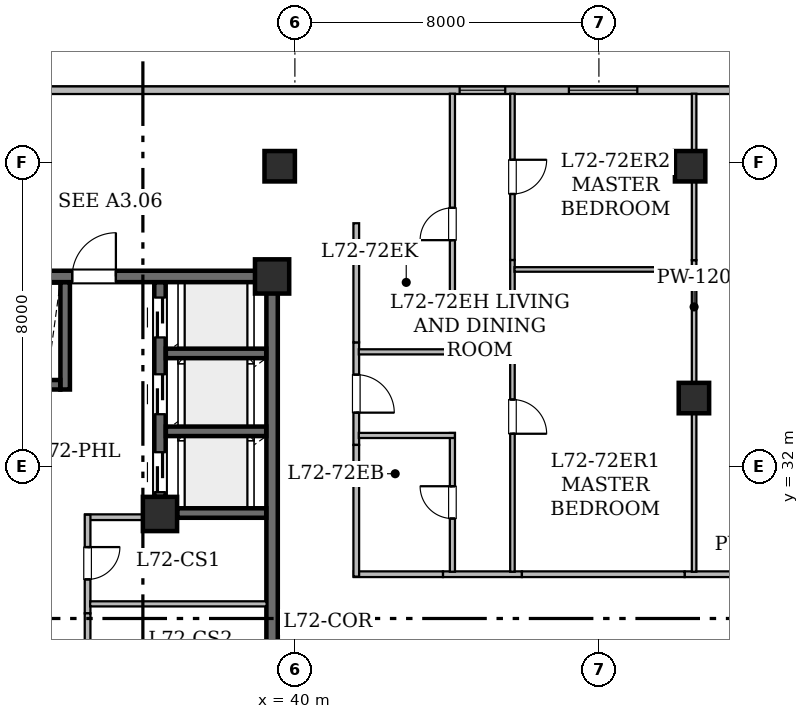
"""IFC4 building model, lengths in metres.
Left out: names, types, materials, properties, quantities, classifications, styles, units other than length and angle.
Written with IfcOpenShell. Run it as: python <this file> out.ifc"""

import sys

from ifc_helpers import new_model, si_unit, direction, frame, frame_2d, origin, origin_2d, place, context, subcontext, project, spatial, rectangle, hollow_rectangle, extrude, element, fill, save


model = new_model("IFC4")
c1 = context("Model", 3, precision=1e-05, world=origin(), true_north=direction((0.0, 1.0)))
c2 = subcontext(c1, "Body", "Model", "MODEL_VIEW")
j1 = project(units=[si_unit("LENGTHUNIT", "METRE"), si_unit("PLANEANGLEUNIT", "RADIAN")], contexts=[c1])
p1 = place(None, origin())
s1 = spatial("IfcSite", under=j1, at=p1, CompositionType="ELEMENT")
p2 = place(p1, origin())
s2 = spatial("IfcBuilding", under=s1, at=p2, CompositionType="ELEMENT")
p3 = place(p2, frame((0.0, 0.0, 282.05)))
s3 = spatial("IfcBuildingStorey", under=s2, at=p3, CompositionType="ELEMENT", Elevation=282.05)
for number, where, z_axis, x_axis in (
    (1, (36.45, 30.75, 0.0), (0.0, 0.0, 1.0), (1.0, 0.0, 0.0)),
    (2, (39.4, 37.0, 0.0), (0.0, 0.0, 1.0), (1.0, 0.0, 0.0)),
):
    element("IfcColumn", number, at=place(p3, frame(where, z_axis=z_axis, x_axis=x_axis)), inside=s3, PredefinedType="COLUMN", context=c2, shape_type="SweptSolid", body=[
        extrude(hollow_rectangle(XDim=0.9, YDim=0.9, WallThickness=0.045, at=origin_2d()), origin(), (0.0, 0.0, 1.0), 4.2),
    ])
for number, where, z_axis, x_axis in (
    (3, (39.6, 39.9, 0.0), (0.0, 0.0, 1.0), (1.0, 0.0, 0.0)),
    (4, (50.4, 39.9, 0.0), (0.0, 0.0, 1.0), (1.0, 0.0, 0.0)),
):
    element("IfcColumn", number, at=place(p3, frame(where, z_axis=z_axis, x_axis=x_axis)), inside=s3, PredefinedType="COLUMN", context=c2, shape_type="SweptSolid", body=[
        extrude(hollow_rectangle(XDim=0.8, YDim=0.8, WallThickness=0.04, at=origin_2d()), origin(), (0.0, 0.0, 1.0), 4.175),
    ])
p4 = place(p3, frame((50.5, 33.8, 0.0), z_axis=(0.0, 0.0, 1.0), x_axis=(1.0, 0.0, 0.0)))
e5 = element("IfcColumn", 5, at=p4, inside=s3, PredefinedType="COLUMN", context=c2, shape_type="SweptSolid", body=[
    extrude(hollow_rectangle(XDim=0.8, YDim=0.8, WallThickness=0.04, at=origin_2d()), origin(), (0.0, 0.0, 1.0), 4.2),
])
p5 = place(p3, frame((27.102, 41.9, 0.0), z_axis=(0.0, 0.0, 1.0), x_axis=(1.0, 0.0, 0.0)))
e6 = element("IfcWall", 6, at=p5, inside=s3, PredefinedType="STANDARD", context=c2, shape_type="SweptSolid", body=[
    extrude(rectangle(XDim=35.857, YDim=0.2, at=frame_2d((17.928, 0.0))), origin(), (0.0, 0.0, 1.0), 3.78),
])
p6 = place(p5, frame((28.338, 0.0, 0.85)))
e7 = element("IfcOpeningElement", 7, at=p6, cuts=e6, PredefinedType="OPENING", context=c2, shape_type="SweptSolid", body=[
    extrude(rectangle(XDim=1.8, YDim=0.92, at=frame_2d((0.9, 0.46))), frame((0.0, 0.11, 0.0), z_axis=(0.0, -1.0, 0.0), x_axis=(1.0, 0.0, 0.0)), (0.0, 0.0, 1.0), 0.22),
])
p7 = place(p5, frame((17.233, 0.0, 0.78)))
e8 = element("IfcOpeningElement", 8, at=p7, cuts=e6, PredefinedType="OPENING", context=c2, shape_type="SweptSolid", body=[
    extrude(rectangle(XDim=1.2, YDim=1.5, at=frame_2d((0.6, 0.75))), frame((0.0, 0.11, 0.0), z_axis=(0.0, -1.0, 0.0), x_axis=(1.0, 0.0, 0.0)), (0.0, 0.0, 1.0), 0.22),
])
p8 = place(p5, frame((20.108, 0.0, 0.85)))
e9 = element("IfcOpeningElement", 9, at=p8, cuts=e6, PredefinedType="OPENING", context=c2, shape_type="SweptSolid", body=[
    extrude(rectangle(XDim=1.8, YDim=0.92, at=frame_2d((0.9, 0.46))), frame((0.0, 0.11, 0.0), z_axis=(0.0, -1.0, 0.0), x_axis=(1.0, 0.0, 0.0)), (0.0, 0.0, 1.0), 0.22),
])
p9 = place(p3, frame((29.0, 37.0, 0.0), z_axis=(0.0, 0.0, 1.0), x_axis=(1.0, 0.0, 0.0)))
e10 = element("IfcWall", 10, at=p9, inside=s3, PredefinedType="SHEAR", context=c2, shape_type="SweptSolid", body=[
    extrude(rectangle(XDim=10.4, YDim=0.3, at=frame_2d((5.2, 0.0))), origin(), (0.0, 0.0, 1.0), 3.78),
])
p10 = place(p9, frame((5.14, 0.0, 0.0)))
e11 = element("IfcOpeningElement", 11, at=p10, cuts=e10, PredefinedType="OPENING", context=c2, shape_type="SweptSolid", body=[
    extrude(rectangle(XDim=1.15, YDim=2.2, at=frame_2d((0.575, 1.1))), frame((0.0, 0.16, 0.0), z_axis=(0.0, -1.0, 0.0), x_axis=(1.0, 0.0, 0.0)), (0.0, 0.0, 1.0), 0.32),
])
p11 = place(p3, frame((39.4, 24.4, 0.0), z_axis=(0.0, 0.0, 1.0), x_axis=(0.0, 1.0, 0.0)))
e12 = element("IfcWall", 12, at=p11, inside=s3, PredefinedType="SHEAR", context=c2, shape_type="SweptSolid", body=[
    extrude(rectangle(XDim=12.6, YDim=0.3, at=frame_2d((6.3, 0.0))), origin(), (0.0, 0.0, 1.0), 3.78),
])
p12 = place(p3, frame((36.45, 31.2, 0.0), z_axis=(0.0, 0.0, 1.0), x_axis=(0.0, 1.0, 0.0)))
e13 = element("IfcWall", 13, at=p12, inside=s3, PredefinedType="SHEAR", context=c2, shape_type="SweptSolid", body=[
    extrude(rectangle(XDim=5.646, YDim=0.3, at=frame_2d((2.823, 0.0))), origin(), (0.0, 0.0, 1.0), 3.78),
])
p13 = place(p12, frame((0.125, 0.0, 0.0)))
e14 = element("IfcOpeningElement", 14, at=p13, cuts=e13, PredefinedType="OPENING", context=c2, shape_type="SweptSolid", body=[
    extrude(rectangle(XDim=1.05, YDim=2.15, at=frame_2d((0.525, 1.075))), frame((0.0, 0.16, 0.0), z_axis=(0.0, -1.0, 0.0), x_axis=(1.0, 0.0, 0.0)), (0.0, 0.0, 1.0), 0.32),
])
p14 = place(p12, frame((2.175, 0.0, 0.0)))
e15 = element("IfcOpeningElement", 15, at=p14, cuts=e13, PredefinedType="OPENING", context=c2, shape_type="SweptSolid", body=[
    extrude(rectangle(XDim=1.05, YDim=2.15, at=frame_2d((0.525, 1.075))), frame((0.0, 0.16, 0.0), z_axis=(0.0, -1.0, 0.0), x_axis=(1.0, 0.0, 0.0)), (0.0, 0.0, 1.0), 0.32),
])
p15 = place(p12, frame((4.195, 0.0, 0.0)))
e16 = element("IfcOpeningElement", 16, at=p15, cuts=e13, PredefinedType="OPENING", context=c2, shape_type="SweptSolid", body=[
    extrude(rectangle(XDim=1.05, YDim=2.15, at=frame_2d((0.525, 1.075))), frame((0.0, 0.16, 0.0), z_axis=(0.0, -1.0, 0.0), x_axis=(1.0, 0.0, 0.0)), (0.0, 0.0, 1.0), 0.32),
])
p16 = place(p3, frame((36.904, 30.775, 0.0), z_axis=(0.0, 0.0, 1.0), x_axis=(1.0, 0.0, 0.0)))
e17 = element("IfcWall", 17, at=p16, inside=s3, PredefinedType="SHEAR", context=c2, shape_type="SweptSolid", body=[
    extrude(rectangle(XDim=2.342, YDim=0.25, at=frame_2d((1.171, 0.0))), origin(), (0.0, 0.0, 1.0), 3.78),
])
for number, where, z_axis, x_axis in (
    (18, (36.604, 32.925, 0.0), (0.0, 0.0, 1.0), (1.0, 0.0, 0.0)),
    (19, (36.604, 34.975, 0.0), (0.0, 0.0, 1.0), (1.0, 0.0, 0.0)),
):
    element("IfcWall", number, at=place(p3, frame(where, z_axis=z_axis, x_axis=x_axis)), inside=s3, PredefinedType="SHEAR", context=c2, shape_type="SweptSolid", body=[
        extrude(rectangle(XDim=2.642, YDim=0.25, at=frame_2d((1.321, 0.0))), origin(), (0.0, 0.0, 1.0), 3.78),
    ])
p17 = place(p3, frame((33.955, 34.025, 0.0), z_axis=(0.0, 0.0, 1.0), x_axis=(0.0, 1.0, 0.0)))
e20 = element("IfcWall", 20, at=p17, inside=s3, PredefinedType="SHEAR", context=c2, shape_type="SweptSolid", body=[
    extrude(rectangle(XDim=2.821, YDim=0.25, at=frame_2d((1.411, 0.0))), origin(), (0.0, 0.0, 1.0), 3.78),
])
p18 = place(p3, frame((32.804, 34.15, 0.0), z_axis=(0.0, 0.0, 1.0), x_axis=(1.0, 0.0, 0.0)))
e21 = element("IfcWall", 21, at=p18, inside=s3, PredefinedType="SHEAR", context=c2, shape_type="SweptSolid", body=[
    extrude(rectangle(XDim=1.022, YDim=0.25, at=frame_2d((0.511, 0.0))), origin(), (0.0, 0.0, 1.0), 3.78),
])
p19 = place(p3, frame((36.3, 30.665, 0.0), z_axis=(0.0, 0.0, 1.0), x_axis=(-1.0, 0.0, 0.0)))
e22 = element("IfcWall", 22, at=p19, inside=s3, PredefinedType="STANDARD", context=c2, shape_type="SweptSolid", body=[
    extrude(rectangle(XDim=1.82, YDim=0.15, at=frame_2d((0.91, 0.0))), origin(), (0.0, 0.0, 1.0), 3.78),
])
p20 = place(p3, frame((34.545, 30.73, 0.0), z_axis=(0.0, 0.0, 1.0), x_axis=(0.0, -1.0, 0.0)))
e23 = element("IfcWall", 23, at=p20, inside=s3, PredefinedType="STANDARD", context=c2, shape_type="SweptSolid", body=[
    extrude(rectangle(XDim=2.594, YDim=0.15, at=frame_2d((1.297, 0.0))), origin(), (0.0, 0.0, 1.0), 3.78),
])
p21 = place(p20, frame((0.851, 0.0, 0.0)))
e24 = element("IfcOpeningElement", 24, at=p21, cuts=e23, PredefinedType="OPENING", context=c2, shape_type="SweptSolid", body=[
    extrude(rectangle(XDim=0.85, YDim=2.1, at=frame_2d((0.425, 1.05))), frame((0.0, 0.085, 0.0), z_axis=(0.0, -1.0, 0.0), x_axis=(1.0, 0.0, 0.0)), (0.0, 0.0, 1.0), 0.17),
])
p22 = place(p3, frame((34.545, 28.136, 0.0), z_axis=(0.0, 0.0, 1.0), x_axis=(0.0, -1.0, 0.0)))
e25 = element("IfcWall", 25, at=p22, inside=s3, PredefinedType="STANDARD", context=c2, shape_type="SweptSolid", body=[
    extrude(rectangle(XDim=3.592, YDim=0.15, at=frame_2d((1.796, 0.0))), origin(), (0.0, 0.0, 1.0), 3.78),
])
p23 = place(p22, frame((1.346, 0.0, 0.0)))
e26 = element("IfcOpeningElement", 26, at=p23, cuts=e25, PredefinedType="OPENING", context=c2, shape_type="SweptSolid", body=[
    extrude(rectangle(XDim=0.9, YDim=2.1, at=frame_2d((0.45, 1.05))), frame((0.0, 0.085, 0.0), z_axis=(0.0, -1.0, 0.0), x_axis=(1.0, 0.0, 0.0)), (0.0, 0.0, 1.0), 0.17),
])
p24 = place(p3, frame((39.256, 28.385, 0.0), z_axis=(0.0, 0.0, 1.0), x_axis=(-1.0, 0.0, 0.0)))
e27 = element("IfcWall", 27, at=p24, inside=s3, PredefinedType="PARTITIONING", context=c2, shape_type="SweptSolid", body=[
    extrude(rectangle(XDim=4.644, YDim=0.135, at=frame_2d((2.322, 0.0))), origin(), (0.0, 0.0, 1.0), 3.78),
])
p25 = place(p3, frame((50.256, 29.165, 0.0), z_axis=(0.0, 0.0, 1.0), x_axis=(1.0, 0.0, 0.0)))
e28 = element("IfcWall", 28, at=p25, inside=s3, PredefinedType="STANDARD", context=c2, shape_type="SweptSolid", body=[
    extrude(rectangle(XDim=11.834, YDim=0.15, at=frame_2d((5.917, 0.0))), origin(), (0.0, 0.0, 1.0), 2.22),
])
p26 = place(p25, frame((5.488, 0.0, 0.0)))
e29 = element("IfcOpeningElement", 29, at=p26, cuts=e28, PredefinedType="OPENING", context=c2, shape_type="SweptSolid", body=[
    extrude(rectangle(XDim=0.9, YDim=2.1, at=frame_2d((0.45, 1.05))), frame((0.0, 0.085, 0.0), z_axis=(0.0, -1.0, 0.0), x_axis=(1.0, 0.0, 0.0)), (0.0, 0.0, 1.0), 0.17),
])
p27 = place(p3, frame((43.896, 29.165, 0.0), z_axis=(0.0, 0.0, 1.0), x_axis=(1.0, 0.0, 0.0)))
e30 = element("IfcWall", 30, at=p27, inside=s3, PredefinedType="STANDARD", context=c2, shape_type="SweptSolid", body=[
    extrude(rectangle(XDim=2.078, YDim=0.15, at=frame_2d((1.039, 0.0))), origin(), (0.0, 0.0, 1.0), 3.78),
])
p28 = place(p3, frame((41.615, 35.265, 0.0), z_axis=(0.0, 0.0, 1.0), x_axis=(0.0, -1.0, 0.0)))
e31 = element("IfcWall", 31, at=p28, inside=s3, PredefinedType="STANDARD", context=c2, shape_type="SweptSolid", body=[
    extrude(rectangle(XDim=2.698, YDim=0.15, at=frame_2d((1.349, 0.0))), origin(), (0.0, 0.0, 1.0), 3.78),
])
p29 = place(p28, frame((0.849, 0.0, 0.0)))
e32 = element("IfcOpeningElement", 32, at=p29, cuts=e31, PredefinedType="OPENING", context=c2, shape_type="SweptSolid", body=[
    extrude(rectangle(XDim=1.0, YDim=2.15, at=frame_2d((0.5, 1.075))), frame((0.0, 0.085, 0.0), z_axis=(0.0, -1.0, 0.0), x_axis=(1.0, 0.0, 0.0)), (0.0, 0.0, 1.0), 0.17),
])
p30 = place(p3, frame((41.55, 29.165, 0.0), z_axis=(0.0, 0.0, 1.0), x_axis=(1.0, 0.0, 0.0)))
e33 = element("IfcWall", 33, at=p30, inside=s3, PredefinedType="STANDARD", context=c2, shape_type="SweptSolid", body=[
    extrude(rectangle(XDim=2.346, YDim=0.15, at=frame_2d((1.173, 0.0))), origin(), (0.0, 0.0, 1.0), 3.78),
])
p31 = place(p3, frame((41.615, 32.567, 0.0), z_axis=(0.0, 0.0, 1.0), x_axis=(0.0, -1.0, 0.0)))
e34 = element("IfcWall", 34, at=p31, inside=s3, PredefinedType="STANDARD", context=c2, shape_type="SweptSolid", body=[
    extrude(rectangle(XDim=3.465, YDim=0.15, at=frame_2d((1.732, 0.0))), origin(), (0.0, 0.0, 1.0), 3.78),
])
p32 = place(p3, frame((41.615, 38.4, 0.0), z_axis=(0.0, 0.0, 1.0), x_axis=(0.0, -1.0, 0.0)))
e35 = element("IfcWall", 35, at=p32, inside=s3, PredefinedType="STANDARD", context=c2, shape_type="SweptSolid", body=[
    extrude(rectangle(XDim=3.135, YDim=0.15, at=frame_2d((1.567, 0.0))), origin(), (0.0, 0.0, 1.0), 2.22),
])
p33 = place(p3, frame((45.974, 29.165, 0.0), z_axis=(0.0, 0.0, 1.0), x_axis=(1.0, 0.0, 0.0)))
e36 = element("IfcWall", 36, at=p33, inside=s3, PredefinedType="STANDARD", context=c2, shape_type="SweptSolid", body=[
    extrude(rectangle(XDim=4.282, YDim=0.15, at=frame_2d((2.141, 0.0))), origin(), (0.0, 0.0, 1.0), 2.22),
])
p34 = place(p3, frame((50.505, 29.23, 0.0), z_axis=(0.0, 0.0, 1.0), x_axis=(0.0, 1.0, 0.0)))
e37 = element("IfcWall", 37, at=p34, inside=s3, PredefinedType="PARTITIONING", context=c2, shape_type="SweptSolid", body=[
    extrude(rectangle(XDim=8.198, YDim=0.12, at=frame_2d((4.099, 0.0))), origin(), (0.0, 0.0, 1.0), 2.22),
])
p35 = place(p3, frame((50.505, 37.428, 0.0), z_axis=(0.0, 0.0, 1.0), x_axis=(0.0, 1.0, 0.0)))
e38 = element("IfcWall", 38, at=p35, inside=s3, PredefinedType="PARTITIONING", context=c2, shape_type="SweptSolid", body=[
    extrude(rectangle(XDim=4.38, YDim=0.12, at=frame_2d((2.19, 0.0))), origin(), (0.0, 0.0, 1.0), 2.22),
])
p36 = place(p3, frame((44.145, 29.23, 0.0), z_axis=(0.0, 0.0, 1.0), x_axis=(0.0, 1.0, 0.0)))
e39 = element("IfcWall", 39, at=p36, inside=s3, PredefinedType="PARTITIONING", context=c2, shape_type="SweptSolid", body=[
    extrude(rectangle(XDim=3.651, YDim=0.135, at=frame_2d((1.826, 0.0))), origin(), (0.0, 0.0, 1.0), 3.78),
])
p37 = place(p36, frame((1.4, 0.0, 0.0)))
e40 = element("IfcOpeningElement", 40, at=p37, cuts=e39, PredefinedType="OPENING", context=c2, shape_type="SweptSolid", body=[
    extrude(rectangle(XDim=0.85, YDim=2.1, at=frame_2d((0.425, 1.05))), frame((0.0, 0.077, 0.0), z_axis=(0.0, -1.0, 0.0), x_axis=(1.0, 0.0, 0.0)), (0.0, 0.0, 1.0), 0.155),
])
for number, where, z_axis, x_axis in (
    (41, (44.21, 32.816, 0.0), (0.0, 0.0, 1.0), (-1.0, 0.0, 0.0)),
    (42, (41.682, 35.016, 0.0), (0.0, 0.0, 1.0), (1.0, 0.0, 0.0)),
):
    element("IfcWall", number, at=place(p3, frame(where, z_axis=z_axis, x_axis=x_axis)), inside=s3, PredefinedType="PARTITIONING", context=c2, shape_type="SweptSolid", body=[
        extrude(rectangle(XDim=2.528, YDim=0.135, at=frame_2d((1.264, 0.0))), origin(), (0.0, 0.0, 1.0), 3.78),
    ])
p38 = place(p3, frame((44.145, 34.951, 0.0), z_axis=(0.0, 0.0, 1.0), x_axis=(0.0, 1.0, 0.0)))
e43 = element("IfcWall", 43, at=p38, inside=s3, PredefinedType="PARTITIONING", context=c2, shape_type="SweptSolid", body=[
    extrude(rectangle(XDim=6.857, YDim=0.135, at=frame_2d((3.429, 0.0))), origin(), (0.0, 0.0, 1.0), 2.22),
])
p39 = place(p38, frame((3.004, 0.0, 0.0)))
e44 = element("IfcOpeningElement", 44, at=p39, cuts=e43, PredefinedType="OPENING", context=c2, shape_type="SweptSolid", body=[
    extrude(rectangle(XDim=0.85, YDim=2.1, at=frame_2d((0.425, 1.05))), frame((0.0, 0.077, 0.0), z_axis=(0.0, -1.0, 0.0), x_axis=(1.0, 0.0, 0.0)), (0.0, 0.0, 1.0), 0.155),
])
p40 = place(p3, frame((45.725, 37.433, 0.0), z_axis=(0.0, 0.0, 1.0), x_axis=(0.0, -1.0, 0.0)))
e45 = element("IfcWall", 45, at=p40, inside=s3, PredefinedType="PARTITIONING", context=c2, shape_type="SweptSolid", body=[
    extrude(rectangle(XDim=8.203, YDim=0.12, at=frame_2d((4.102, 0.0))), origin(), (0.0, 0.0, 1.0), 2.22),
])
p41 = place(p40, frame((3.672, 0.0, 0.0)))
e46 = element("IfcOpeningElement", 46, at=p41, cuts=e45, PredefinedType="OPENING", context=c2, shape_type="SweptSolid", body=[
    extrude(rectangle(XDim=0.9, YDim=2.1, at=frame_2d((0.45, 1.05))), frame((0.0, 0.07, 0.0), z_axis=(0.0, -1.0, 0.0), x_axis=(1.0, 0.0, 0.0)), (0.0, 0.0, 1.0), 0.14),
])
p42 = place(p3, frame((45.725, 41.808, 0.0), z_axis=(0.0, 0.0, 1.0), x_axis=(0.0, -1.0, 0.0)))
e47 = element("IfcWall", 47, at=p42, inside=s3, PredefinedType="PARTITIONING", context=c2, shape_type="SweptSolid", body=[
    extrude(rectangle(XDim=4.375, YDim=0.12, at=frame_2d((2.188, 0.0))), origin(), (0.0, 0.0, 1.0), 2.22),
])
p43 = place(p42, frame((1.738, 0.0, 0.0)))
e48 = element("IfcOpeningElement", 48, at=p43, cuts=e47, PredefinedType="OPENING", context=c2, shape_type="SweptSolid", body=[
    extrude(rectangle(XDim=0.9, YDim=2.1, at=frame_2d((0.45, 1.05))), frame((0.0, 0.07, 0.0), z_axis=(0.0, -1.0, 0.0), x_axis=(1.0, 0.0, 0.0)), (0.0, 0.0, 1.0), 0.14),
])
p44 = place(p3, frame((45.779, 37.184, 0.0), z_axis=(0.0, 0.0, 1.0), x_axis=(1.0, 0.0, 0.0)))
e49 = element("IfcWall", 49, at=p44, inside=s3, PredefinedType="PARTITIONING", context=c2, shape_type="SweptSolid", body=[
    extrude(rectangle(XDim=4.672, YDim=0.12, at=frame_2d((2.336, 0.0))), origin(), (0.0, 0.0, 1.0), 2.837),
])
p45 = place(p7, origin())
e50 = element("IfcWindow", 50, at=p45, inside=s3, PartitioningType="SINGLE_PANEL", PredefinedType="WINDOW", context=c2, shape_type="SweptSolid", body=[
    extrude(rectangle(XDim=1.2, YDim=1.5, at=frame_2d((0.6, 0.75))), frame((0.0, 0.03, 0.0), z_axis=(0.0, -1.0, 0.0), x_axis=(1.0, 0.0, 0.0)), (0.0, 0.0, 1.0), 0.06),
])
fill(e8, e50)
p46 = place(p8, origin())
e51 = element("IfcWindow", 51, at=p46, inside=s3, PartitioningType="SINGLE_PANEL", PredefinedType="WINDOW", context=c2, shape_type="SweptSolid", body=[
    extrude(rectangle(XDim=1.8, YDim=0.92, at=frame_2d((0.9, 0.46))), frame((0.0, 0.03, 0.0), z_axis=(0.0, -1.0, 0.0), x_axis=(1.0, 0.0, 0.0)), (0.0, 0.0, 1.0), 0.06),
])
fill(e9, e51)
p47 = place(p10, origin())
e52 = element("IfcDoor", 52, at=p47, inside=s3, OperationType="SINGLE_SWING_RIGHT", PredefinedType="DOOR", context=c2, shape_type="SweptSolid", body=[
    extrude(rectangle(XDim=1.15, YDim=2.2, at=frame_2d((0.575, 1.1))), frame((0.0, 0.025, 0.0), z_axis=(0.0, -1.0, 0.0), x_axis=(1.0, 0.0, 0.0)), (0.0, 0.0, 1.0), 0.05),
])
fill(e11, e52)
p48 = place(p13, origin())
e53 = element("IfcDoor", 53, at=p48, inside=s3, OperationType="SLIDING_TO_LEFT", PredefinedType="DOOR", context=c2, shape_type="SweptSolid", body=[
    extrude(rectangle(XDim=1.05, YDim=2.15, at=frame_2d((0.525, 1.075))), frame((0.0, 0.025, 0.0), z_axis=(0.0, -1.0, 0.0), x_axis=(1.0, 0.0, 0.0)), (0.0, 0.0, 1.0), 0.05),
])
fill(e14, e53)
p49 = place(p14, origin())
e54 = element("IfcDoor", 54, at=p49, inside=s3, OperationType="SLIDING_TO_LEFT", PredefinedType="DOOR", context=c2, shape_type="SweptSolid", body=[
    extrude(rectangle(XDim=1.05, YDim=2.15, at=frame_2d((0.525, 1.075))), frame((0.0, 0.025, 0.0), z_axis=(0.0, -1.0, 0.0), x_axis=(1.0, 0.0, 0.0)), (0.0, 0.0, 1.0), 0.05),
])
fill(e15, e54)
p50 = place(p15, origin())
e55 = element("IfcDoor", 55, at=p50, inside=s3, OperationType="SLIDING_TO_LEFT", PredefinedType="DOOR", context=c2, shape_type="SweptSolid", body=[
    extrude(rectangle(XDim=1.05, YDim=2.15, at=frame_2d((0.525, 1.075))), frame((0.0, 0.025, 0.0), z_axis=(0.0, -1.0, 0.0), x_axis=(1.0, 0.0, 0.0)), (0.0, 0.0, 1.0), 0.05),
])
fill(e16, e55)
p51 = place(p21, origin())
e56 = element("IfcDoor", 56, at=p51, inside=s3, OperationType="SINGLE_SWING_LEFT", PredefinedType="DOOR", context=c2, shape_type="SweptSolid", body=[
    extrude(rectangle(XDim=0.85, YDim=2.1, at=frame_2d((0.425, 1.05))), frame((0.0, 0.025, 0.0), z_axis=(0.0, -1.0, 0.0), x_axis=(1.0, 0.0, 0.0)), (0.0, 0.0, 1.0), 0.05),
])
fill(e24, e56)
p52 = place(p29, origin())
e57 = element("IfcDoor", 57, at=p52, inside=s3, OperationType="SINGLE_SWING_RIGHT", PredefinedType="DOOR", context=c2, shape_type="SweptSolid", body=[
    extrude(rectangle(XDim=1.0, YDim=2.15, at=frame_2d((0.5, 1.075))), frame((0.0, 0.025, 0.0), z_axis=(0.0, -1.0, 0.0), x_axis=(1.0, 0.0, 0.0)), (0.0, 0.0, 1.0), 0.05),
])
fill(e32, e57)
p53 = place(p37, origin())
e58 = element("IfcDoor", 58, at=p53, inside=s3, OperationType="SINGLE_SWING_RIGHT", PredefinedType="DOOR", context=c2, shape_type="SweptSolid", body=[
    extrude(rectangle(XDim=0.85, YDim=2.1, at=frame_2d((0.425, 1.05))), frame((0.0, 0.025, 0.0), z_axis=(0.0, -1.0, 0.0), x_axis=(1.0, 0.0, 0.0)), (0.0, 0.0, 1.0), 0.05),
])
fill(e40, e58)
p54 = place(p39, origin())
e59 = element("IfcDoor", 59, at=p54, inside=s3, OperationType="SINGLE_SWING_LEFT", PredefinedType="DOOR", context=c2, shape_type="SweptSolid", body=[
    extrude(rectangle(XDim=0.85, YDim=2.1, at=frame_2d((0.425, 1.05))), frame((0.0, 0.025, 0.0), z_axis=(0.0, -1.0, 0.0), x_axis=(1.0, 0.0, 0.0)), (0.0, 0.0, 1.0), 0.05),
])
fill(e44, e59)
p55 = place(p41, origin())
e60 = element("IfcDoor", 60, at=p55, inside=s3, OperationType="SINGLE_SWING_RIGHT", PredefinedType="DOOR", context=c2, shape_type="SweptSolid", body=[
    extrude(rectangle(XDim=0.9, YDim=2.1, at=frame_2d((0.45, 1.05))), frame((0.0, 0.025, 0.0), z_axis=(0.0, -1.0, 0.0), x_axis=(1.0, 0.0, 0.0)), (0.0, 0.0, 1.0), 0.05),
])
fill(e46, e60)
p56 = place(p43, origin())
e61 = element("IfcDoor", 61, at=p56, inside=s3, OperationType="SINGLE_SWING_LEFT", PredefinedType="DOOR", context=c2, shape_type="SweptSolid", body=[
    extrude(rectangle(XDim=0.9, YDim=2.1, at=frame_2d((0.45, 1.05))), frame((0.0, 0.025, 0.0), z_axis=(0.0, -1.0, 0.0), x_axis=(1.0, 0.0, 0.0)), (0.0, 0.0, 1.0), 0.05),
])
fill(e48, e61)
save(model, sys.argv[1])
